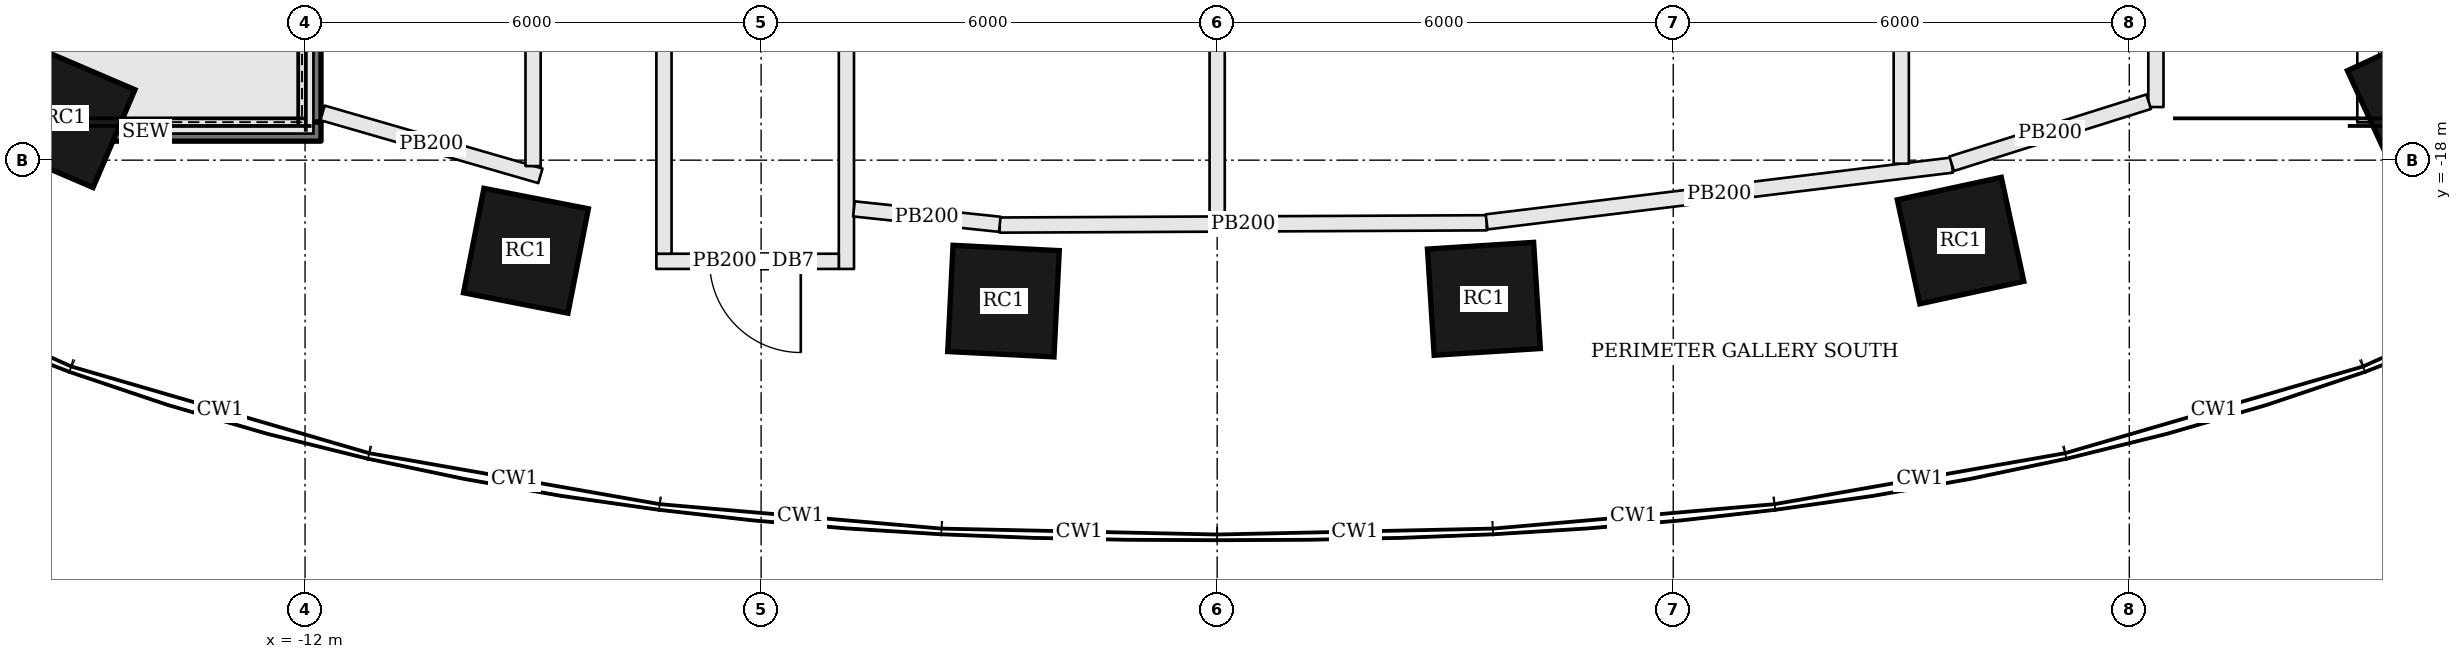
"""IFC4 building model, lengths in metres.
Left out: names, types, materials, properties, quantities, classifications, styles, units other than length and angle.
Written with IfcOpenShell. Run it as: python <this file> out.ifc"""

import sys

from ifc_helpers import new_model, si_unit, direction, frame, frame_2d, origin, origin_2d, place, context, subcontext, project, spatial, rectangle, extrude, element, fill, save


model = new_model("IFC4")
c1 = context("Model", 3, precision=1e-05, world=origin(), true_north=direction((0.0, 1.0)))
c2 = subcontext(c1, "Body", "Model", "MODEL_VIEW")
j1 = project(units=[si_unit("LENGTHUNIT", "METRE"), si_unit("PLANEANGLEUNIT", "RADIAN")], contexts=[c1])
p1 = place(None, origin())
s1 = spatial("IfcSite", under=j1, at=p1, CompositionType="ELEMENT")
p2 = place(p1, origin())
s2 = spatial("IfcBuilding", under=s1, at=p2, CompositionType="ELEMENT")
p3 = place(p2, frame((0.0, 0.0, 22.8)))
s3 = spatial("IfcBuildingStorey", under=s2, at=p3, CompositionType="ELEMENT", Elevation=22.8)
for number, where, z_axis, x_axis in (
    (1, (-15.157, -17.441, 0.0), (0.0, 0.0, 1.0), (0.919, -0.394, 0.0)),
    (2, (-9.094, -19.192, 0.0), (0.0, 0.0, 1.0), (0.981, -0.192, 0.0)),
    (3, (-2.811, -19.854, 0.0), (0.0, 0.0, 1.0), (0.999, -0.05, 0.0)),
    (4, (3.509, -19.824, 0.0), (0.0, 0.0, 1.0), (0.998, 0.063, 0.0)),
    (5, (9.78, -19.058, 0.0), (0.0, 0.0, 1.0), (0.977, 0.211, 0.0)),
    (6, (15.799, -17.165, 0.0), (0.0, 0.0, 1.0), (0.908, 0.419, 0.0)),
):
    element("IfcColumn", number, at=place(p3, frame(where, z_axis=z_axis, x_axis=x_axis)), inside=s3, PredefinedType="COLUMN", context=c2, shape_type="SweptSolid", body=[
        extrude(rectangle(XDim=1.4, YDim=1.4, at=origin_2d()), origin(), (0.0, 0.0, 1.0), 5.4),
    ])
p4 = place(p3, frame((-4.878, -6.1, 0.0), z_axis=(0.0, 0.0, 1.0), x_axis=(0.0, -1.0, 0.0)))
e7 = element("IfcWall", 7, at=p4, inside=s3, PredefinedType="PARTITIONING", context=c2, shape_type="SweptSolid", body=[
    extrude(rectangle(XDim=13.331, YDim=0.2, at=frame_2d((6.666, 0.0))), origin(), (0.0, 0.0, 1.0), 4.43),
])
p5 = place(p3, frame((-4.978, -19.331, 0.0), z_axis=(0.0, 0.0, 1.0), x_axis=(-1.0, 0.0, 0.0)))
e8 = element("IfcWall", 8, at=p5, inside=s3, PredefinedType="PARTITIONING", context=c2, shape_type="SweptSolid", body=[
    extrude(rectangle(XDim=2.4, YDim=0.2, at=frame_2d((1.2, 0.0))), origin(), (0.0, 0.0, 1.0), 4.43),
])
p6 = place(p5, frame((0.5, 0.0, 0.0)))
e9 = element("IfcOpeningElement", 9, at=p6, cuts=e8, PredefinedType="OPENING", context=c2, shape_type="SweptSolid", body=[
    extrude(rectangle(XDim=1.2, YDim=2.1, at=frame_2d((0.6, 1.05))), frame((0.0, 0.11, 0.0), z_axis=(0.0, -1.0, 0.0), x_axis=(1.0, 0.0, 0.0)), (0.0, 0.0, 1.0), 0.22),
])
p7 = place(p3, frame((-7.278, -19.231, 0.0), z_axis=(0.0, 0.0, 1.0), x_axis=(0.0, 1.0, 0.0)))
e10 = element("IfcWall", 10, at=p7, inside=s3, PredefinedType="PARTITIONING", context=c2, shape_type="SweptSolid", body=[
    extrude(rectangle(XDim=13.131, YDim=0.2, at=frame_2d((6.565, 0.0))), origin(), (0.0, 0.0, 1.0), 4.43),
])
p8 = place(p3, frame((-8.904, -18.206, 0.0), z_axis=(0.0, 0.0, 1.0), x_axis=(-0.960698179161, 0.277595044187, 0.0)))
e11 = element("IfcWall", 11, at=p8, inside=s3, PredefinedType="PARTITIONING", context=c2, shape_type="SweptSolid", body=[
    extrude(rectangle(XDim=2.983, YDim=0.2, at=frame_2d((1.492, 0.0))), origin(), (0.0, 0.0, 1.0), 4.43),
])
p9 = place(p3, frame((-9.0, -6.1, 0.0), z_axis=(0.0, 0.0, 1.0), x_axis=(0.0, -1.0, 0.0)))
e12 = element("IfcWall", 12, at=p9, inside=s3, PredefinedType="PARTITIONING", context=c2, shape_type="SweptSolid", body=[
    extrude(rectangle(XDim=11.978, YDim=0.2, at=frame_2d((5.989, 0.0))), origin(), (0.0, 0.0, 1.0), 4.43),
])
p10 = place(p3, frame((3.546, -18.824, 0.0), z_axis=(0.0, 0.0, 1.0), x_axis=(-0.999989016365, -0.004686912663, 0.0)))
e13 = element("IfcWall", 13, at=p10, inside=s3, PredefinedType="PARTITIONING", context=c2, shape_type="SweptSolid", body=[
    extrude(rectangle(XDim=6.407, YDim=0.2, at=frame_2d((3.204, 0.0))), origin(), (0.0, 0.0, 1.0), 4.43),
])
p11 = place(p3, frame((-2.86, -18.844, 0.0), z_axis=(0.0, 0.0, 1.0), x_axis=(-0.994457513639, 0.105139210412, 0.0)))
e14 = element("IfcWall", 14, at=p11, inside=s3, PredefinedType="PARTITIONING", context=c2, shape_type="SweptSolid", body=[
    extrude(rectangle(XDim=1.93, YDim=0.2, at=frame_2d((0.965, 0.0))), origin(), (0.0, 0.0, 1.0), 4.43),
])
p12 = place(p3, frame((0.0, -6.1, 0.0), z_axis=(0.0, 0.0, 1.0), x_axis=(0.0, -1.0, 0.0)))
e15 = element("IfcWall", 15, at=p12, inside=s3, PredefinedType="PARTITIONING", context=c2, shape_type="SweptSolid", body=[
    extrude(rectangle(XDim=12.641, YDim=0.2, at=frame_2d((6.32, 0.0))), origin(), (0.0, 0.0, 1.0), 4.43),
])
p13 = place(p3, frame((9.667, -18.065, 0.0), z_axis=(0.0, 0.0, 1.0), x_axis=(-0.992636593244, -0.121130482347, 0.0)))
e16 = element("IfcWall", 16, at=p13, inside=s3, PredefinedType="PARTITIONING", context=c2, shape_type="SweptSolid", body=[
    extrude(rectangle(XDim=6.167, YDim=0.2, at=frame_2d((3.084, 0.0))), origin(), (0.0, 0.0, 1.0), 4.43),
])
p14 = place(p3, frame((9.0, -6.1, 0.0), z_axis=(0.0, 0.0, 1.0), x_axis=(0.0, -1.0, 0.0)))
e17 = element("IfcWall", 17, at=p14, inside=s3, PredefinedType="PARTITIONING", context=c2, shape_type="SweptSolid", body=[
    extrude(rectangle(XDim=11.946, YDim=0.2, at=frame_2d((5.973, 0.0))), origin(), (0.0, 0.0, 1.0), 4.43),
])
p15 = place(p3, frame((12.35, -12.55, 0.0), z_axis=(0.0, 0.0, 1.0), x_axis=(0.0, -1.0, 0.0)))
e18 = element("IfcWall", 18, at=p15, inside=s3, PredefinedType="PARTITIONING", context=c2, shape_type="SweptSolid", body=[
    extrude(rectangle(XDim=4.751, YDim=0.2, at=frame_2d((2.375, 0.0))), origin(), (0.0, 0.0, 1.0), 4.43),
])
p16 = place(p3, frame((12.255, -17.231, 0.0), z_axis=(0.0, 0.0, 1.0), x_axis=(-0.953825419117, -0.300361565195, 0.0)))
e19 = element("IfcWall", 19, at=p16, inside=s3, PredefinedType="PARTITIONING", context=c2, shape_type="SweptSolid", body=[
    extrude(rectangle(XDim=2.717, YDim=0.2, at=frame_2d((1.359, 0.0))), origin(), (0.0, 0.0, 1.0), 4.43),
])
p17 = place(p3, frame((-11.915, -17.5, 0.0), z_axis=(0.0, 0.0, 1.0), x_axis=(0.0, 1.0, 0.0)))
e20 = element("IfcWall", 20, at=p17, inside=s3, PredefinedType="SOLIDWALL", context=c2, shape_type="SweptSolid", body=[
    extrude(rectangle(XDim=4.95, YDim=0.25, at=frame_2d((2.475, 0.0))), origin(), (0.0, 0.0, 1.0), 5.15),
])
p18 = place(p3, frame((-16.4, -17.625, 0.0), z_axis=(0.0, 0.0, 1.0), x_axis=(1.0, 0.0, 0.0)))
e21 = element("IfcWall", 21, at=p18, inside=s3, PredefinedType="SOLIDWALL", context=c2, shape_type="SweptSolid", body=[
    extrude(rectangle(XDim=4.61, YDim=0.25, at=frame_2d((2.305, 0.0))), origin(), (0.0, 0.0, 1.0), 5.15),
])
p19 = place(p6, origin())
e22 = element("IfcDoor", 22, at=p19, inside=s3, OperationType="SINGLE_SWING_LEFT", PredefinedType="DOOR", context=c2, shape_type="SweptSolid", body=[
    extrude(rectangle(XDim=1.2, YDim=2.1, at=frame_2d((0.6, 1.05))), frame((0.0, 0.025, 0.0), z_axis=(0.0, -1.0, 0.0), x_axis=(1.0, 0.0, 0.0)), (0.0, 0.0, 1.0), 0.05),
])
fill(e9, e22)
save(model, sys.argv[1])
